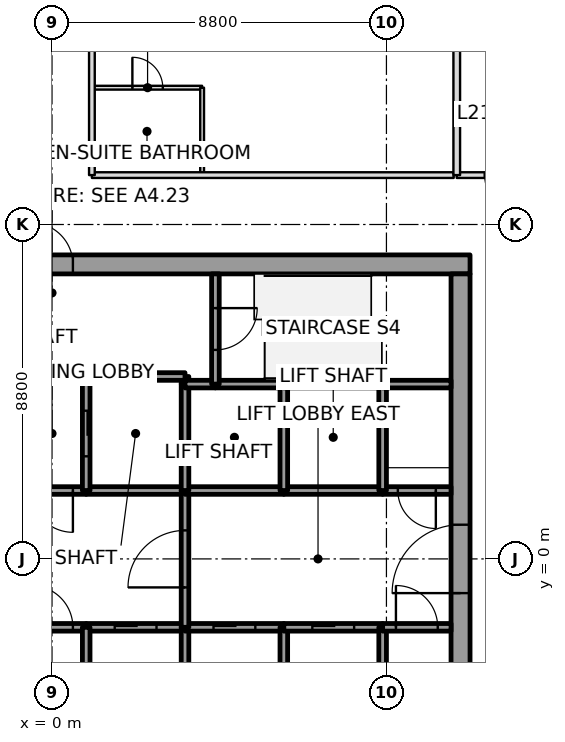
"""IFC4 building model, lengths in metres.
Left out: names, types, materials, properties, quantities, classifications, styles, units other than length and angle.
Written with IfcOpenShell. Run it as: python <this file> out.ifc"""

import sys

from ifc_helpers import new_model, si_unit, direction, frame, frame_2d, origin, place, context, subcontext, project, spatial, rectangle, extrude, element, fill, save


model = new_model("IFC4")
c1 = context("Model", 3, precision=1e-05, world=origin(), true_north=direction((0.0, 1.0)))
c2 = subcontext(c1, "Body", "Model", "MODEL_VIEW")
j1 = project(units=[si_unit("LENGTHUNIT", "METRE"), si_unit("PLANEANGLEUNIT", "RADIAN")], contexts=[c1])
p1 = place(None, origin())
s1 = spatial("IfcSite", under=j1, at=p1, CompositionType="ELEMENT")
p2 = place(p1, origin())
s2 = spatial("IfcBuilding", under=s1, at=p2, CompositionType="ELEMENT")
p3 = place(p2, frame((0.0, 0.0, 99.8)))
s3 = spatial("IfcBuildingStorey", under=s2, at=p3, CompositionType="ELEMENT", Elevation=99.8)
p4 = place(p3, frame((-11.0, 7.75, 0.0), z_axis=(0.0, 0.0, 1.0), x_axis=(1.0, 0.0, 0.0)))
e1 = element("IfcWall", 1, at=p4, inside=s3, PredefinedType="SHEAR", context=c2, shape_type="SweptSolid", body=[
    extrude(rectangle(XDim=22.0, YDim=0.5, at=frame_2d((11.0, 0.0))), origin(), (0.0, 0.0, 1.0), 3.7),
])
p5 = place(p4, frame((10.45, 0.0, 0.0)))
e2 = element("IfcOpeningElement", 2, at=p5, cuts=e1, PredefinedType="OPENING", context=c2, shape_type="SweptSolid", body=[
    extrude(rectangle(XDim=1.1, YDim=2.1, at=frame_2d((0.55, 1.05))), frame((0.0, 0.25, 0.0), z_axis=(0.0, -1.0, 0.0), x_axis=(1.0, 0.0, 0.0)), (0.0, 0.0, 1.0), 0.5),
])
p6 = place(p3, frame((10.75, -7.5, 0.0), z_axis=(0.0, 0.0, 1.0), x_axis=(0.0, 1.0, 0.0)))
e3 = element("IfcWall", 3, at=p6, inside=s3, PredefinedType="SHEAR", context=c2, shape_type="SweptSolid", body=[
    extrude(rectangle(XDim=15.0, YDim=0.5, at=frame_2d((7.5, 0.0))), origin(), (0.0, 0.0, 1.0), 3.7),
])
p7 = place(p6, frame((6.6, 0.0, 0.0)))
e4 = element("IfcOpeningElement", 4, at=p7, cuts=e3, PredefinedType="OPENING", context=c2, shape_type="SweptSolid", body=[
    extrude(rectangle(XDim=1.8, YDim=2.1, at=frame_2d((0.9, 1.05))), frame((0.0, 0.25, 0.0), z_axis=(0.0, -1.0, 0.0), x_axis=(1.0, 0.0, 0.0)), (0.0, 0.0, 1.0), 0.5),
])
p8 = place(p3, frame((-0.9, -1.8, 0.0), z_axis=(0.0, 0.0, 1.0), x_axis=(1.0, 0.0, 0.0)))
e5 = element("IfcWall", 5, at=p8, inside=s3, PredefinedType="SOLIDWALL", context=c2, shape_type="SweptSolid", body=[
    extrude(rectangle(XDim=1.8, YDim=0.2, at=frame_2d((0.9, 0.0))), origin(), (0.0, 0.0, 1.0), 3.55),
])
p9 = place(p8, frame((0.35, 0.0, 0.0)))
e6 = element("IfcOpeningElement", 6, at=p9, cuts=e5, PredefinedType="OPENING", context=c2, shape_type="SweptSolid", body=[
    extrude(rectangle(XDim=1.1, YDim=2.1, at=frame_2d((0.55, 1.05))), frame((0.0, 0.1, 0.0), z_axis=(0.0, -1.0, 0.0), x_axis=(1.0, 0.0, 0.0)), (0.0, 0.0, 1.0), 0.2),
])
p10 = place(p3, frame((0.9, 1.8, 0.0), z_axis=(0.0, 0.0, 1.0), x_axis=(-1.0, 0.0, 0.0)))
e7 = element("IfcWall", 7, at=p10, inside=s3, PredefinedType="SOLIDWALL", context=c2, shape_type="SweptSolid", body=[
    extrude(rectangle(XDim=1.8, YDim=0.2, at=frame_2d((0.9, 0.0))), origin(), (0.0, 0.0, 1.0), 3.55),
])
p11 = place(p10, frame((0.35, 0.0, 0.0)))
e8 = element("IfcOpeningElement", 8, at=p11, cuts=e7, PredefinedType="OPENING", context=c2, shape_type="SweptSolid", body=[
    extrude(rectangle(XDim=1.1, YDim=2.1, at=frame_2d((0.55, 1.05))), frame((0.0, 0.1, 0.0), z_axis=(0.0, -1.0, 0.0), x_axis=(1.0, 0.0, 0.0)), (0.0, 0.0, 1.0), 0.2),
])
p12 = place(p3, frame((0.9, -1.8, 0.0), z_axis=(0.0, 0.0, 1.0), x_axis=(1.0, 0.0, 0.0)))
e9 = element("IfcWall", 9, at=p12, inside=s3, PredefinedType="SOLIDWALL", context=c2, shape_type="SweptSolid", body=[
    extrude(rectangle(XDim=2.6, YDim=0.2, at=frame_2d((1.3, 0.0))), origin(), (0.0, 0.0, 1.0), 3.55),
])
p13 = place(p12, frame((0.75, 0.0, 0.0)))
e10 = element("IfcOpeningElement", 10, at=p13, cuts=e9, PredefinedType="OPENING", context=c2, shape_type="SweptSolid", body=[
    extrude(rectangle(XDim=1.1, YDim=2.1, at=frame_2d((0.55, 1.05))), frame((0.0, 0.1, 0.0), z_axis=(0.0, -1.0, 0.0), x_axis=(1.0, 0.0, 0.0)), (0.0, 0.0, 1.0), 0.2),
])
p14 = place(p3, frame((0.9, -1.8, 0.0), z_axis=(0.0, 0.0, 1.0), x_axis=(0.0, -1.0, 0.0)))
e11 = element("IfcWall", 11, at=p14, inside=s3, PredefinedType="SOLIDWALL", context=c2, shape_type="SweptSolid", body=[
    extrude(rectangle(XDim=2.8, YDim=0.2, at=frame_2d((1.4, 0.0))), origin(), (0.0, 0.0, 1.0), 3.55),
])
p15 = place(p3, frame((3.5, 1.8, 0.0), z_axis=(0.0, 0.0, 1.0), x_axis=(-1.0, 0.0, 0.0)))
e12 = element("IfcWall", 12, at=p15, inside=s3, PredefinedType="SOLIDWALL", context=c2, shape_type="SweptSolid", body=[
    extrude(rectangle(XDim=2.6, YDim=0.2, at=frame_2d((1.3, 0.0))), origin(), (0.0, 0.0, 1.0), 3.55),
])
p16 = place(p3, frame((3.5, 4.6, 0.0), z_axis=(0.0, 0.0, 1.0), x_axis=(0.0, 1.0, 0.0)))
e13 = element("IfcWall", 13, at=p16, inside=s3, PredefinedType="SOLIDWALL", context=c2, shape_type="SweptSolid", body=[
    extrude(rectangle(XDim=0.2, YDim=0.2, at=frame_2d((0.1, 0.0))), origin(), (0.0, 0.0, 1.0), 3.55),
])
p17 = place(p3, frame((3.5, 4.8, 0.0), z_axis=(0.0, 0.0, 1.0), x_axis=(-1.0, 0.0, 0.0)))
e14 = element("IfcWall", 14, at=p17, inside=s3, PredefinedType="SOLIDWALL", context=c2, shape_type="SweptSolid", body=[
    extrude(rectangle(XDim=2.6, YDim=0.2, at=frame_2d((1.3, 0.0))), origin(), (0.0, 0.0, 1.0), 3.55),
])
p18 = place(p3, frame((0.9, 4.8, 0.0), z_axis=(0.0, 0.0, 1.0), x_axis=(0.0, -1.0, 0.0)))
e15 = element("IfcWall", 15, at=p18, inside=s3, PredefinedType="SOLIDWALL", context=c2, shape_type="SweptSolid", body=[
    extrude(rectangle(XDim=3.0, YDim=0.2, at=frame_2d((1.5, 0.0))), origin(), (0.0, 0.0, 1.0), 3.55),
])
p19 = place(p18, frame((0.9, 0.0, 0.0)))
e16 = element("IfcOpeningElement", 16, at=p19, cuts=e15, PredefinedType="OPENING", context=c2, shape_type="SweptSolid", body=[
    extrude(rectangle(XDim=1.2, YDim=2.1, at=frame_2d((0.6, 1.05))), frame((0.0, 0.1, 0.0), z_axis=(0.0, -1.0, 0.0), x_axis=(1.0, 0.0, 0.0)), (0.0, 0.0, 1.0), 0.2),
])
p20 = place(p3, frame((3.5, -4.6, 0.0), z_axis=(0.0, 0.0, 1.0), x_axis=(0.0, 1.0, 0.0)))
e17 = element("IfcWall", 17, at=p20, inside=s3, PredefinedType="SOLIDWALL", context=c2, shape_type="SweptSolid", body=[
    extrude(rectangle(XDim=2.8, YDim=0.2, at=frame_2d((1.4, 0.0))), origin(), (0.0, 0.0, 1.0), 3.55),
])
p21 = place(p3, frame((3.5, -1.8, 0.0), z_axis=(0.0, 0.0, 1.0), x_axis=(1.0, 0.0, 0.0)))
e18 = element("IfcWall", 18, at=p21, inside=s3, PredefinedType="SOLIDWALL", context=c2, shape_type="SweptSolid", body=[
    extrude(rectangle(XDim=2.6, YDim=0.2, at=frame_2d((1.3, 0.0))), origin(), (0.0, 0.0, 1.0), 3.55),
])
p22 = place(p21, frame((0.75, 0.0, 0.0)))
e19 = element("IfcOpeningElement", 19, at=p22, cuts=e18, PredefinedType="OPENING", context=c2, shape_type="SweptSolid", body=[
    extrude(rectangle(XDim=1.1, YDim=2.1, at=frame_2d((0.55, 1.05))), frame((0.0, 0.1, 0.0), z_axis=(0.0, -1.0, 0.0), x_axis=(1.0, 0.0, 0.0)), (0.0, 0.0, 1.0), 0.2),
])
p23 = place(p3, frame((3.5, -1.8, 0.0), z_axis=(0.0, 0.0, 1.0), x_axis=(0.0, 1.0, 0.0)))
e20 = element("IfcWall", 20, at=p23, inside=s3, PredefinedType="SOLIDWALL", context=c2, shape_type="SweptSolid", body=[
    extrude(rectangle(XDim=3.6, YDim=0.2, at=frame_2d((1.8, 0.0))), origin(), (0.0, 0.0, 1.0), 3.55),
])
p24 = place(p23, frame((1.05, 0.0, 0.0)))
e21 = element("IfcOpeningElement", 21, at=p24, cuts=e20, PredefinedType="OPENING", context=c2, shape_type="SweptSolid", body=[
    extrude(rectangle(XDim=1.5, YDim=2.1, at=frame_2d((0.75, 1.05))), frame((0.0, 0.1, 0.0), z_axis=(0.0, -1.0, 0.0), x_axis=(1.0, 0.0, 0.0)), (0.0, 0.0, 1.0), 0.2),
])
p25 = place(p3, frame((6.1, 1.8, 0.0), z_axis=(0.0, 0.0, 1.0), x_axis=(-1.0, 0.0, 0.0)))
e22 = element("IfcWall", 22, at=p25, inside=s3, PredefinedType="SOLIDWALL", context=c2, shape_type="SweptSolid", body=[
    extrude(rectangle(XDim=2.6, YDim=0.2, at=frame_2d((1.3, 0.0))), origin(), (0.0, 0.0, 1.0), 3.55),
])
p26 = place(p3, frame((3.5, 1.8, 0.0), z_axis=(0.0, 0.0, 1.0), x_axis=(0.0, 1.0, 0.0)))
e23 = element("IfcWall", 23, at=p26, inside=s3, PredefinedType="SOLIDWALL", context=c2, shape_type="SweptSolid", body=[
    extrude(rectangle(XDim=2.8, YDim=0.2, at=frame_2d((1.4, 0.0))), origin(), (0.0, 0.0, 1.0), 3.55),
])
p27 = place(p3, frame((4.3, 4.6, 0.0), z_axis=(0.0, 0.0, 1.0), x_axis=(-1.0, 0.0, 0.0)))
e24 = element("IfcWall", 24, at=p27, inside=s3, PredefinedType="SOLIDWALL", context=c2, shape_type="SweptSolid", body=[
    extrude(rectangle(XDim=0.8, YDim=0.2, at=frame_2d((0.4, 0.0))), origin(), (0.0, 0.0, 1.0), 3.55),
])
p28 = place(p3, frame((6.1, 4.6, 0.0), z_axis=(0.0, 0.0, 1.0), x_axis=(-1.0, 0.0, 0.0)))
e25 = element("IfcWall", 25, at=p28, inside=s3, PredefinedType="SOLIDWALL", context=c2, shape_type="SweptSolid", body=[
    extrude(rectangle(XDim=1.8, YDim=0.2, at=frame_2d((0.9, 0.0))), origin(), (0.0, 0.0, 1.0), 3.55),
])
p29 = place(p3, frame((4.3, 7.5, 0.0), z_axis=(0.0, 0.0, 1.0), x_axis=(0.0, -1.0, 0.0)))
e26 = element("IfcWall", 26, at=p29, inside=s3, PredefinedType="SOLIDWALL", context=c2, shape_type="SweptSolid", body=[
    extrude(rectangle(XDim=2.9, YDim=0.2, at=frame_2d((1.45, 0.0))), origin(), (0.0, 0.0, 1.0), 3.55),
])
p30 = place(p29, frame((0.9, 0.0, 0.0)))
e27 = element("IfcOpeningElement", 27, at=p30, cuts=e26, PredefinedType="OPENING", context=c2, shape_type="SweptSolid", body=[
    extrude(rectangle(XDim=1.1, YDim=2.1, at=frame_2d((0.55, 1.05))), frame((0.0, 0.1, 0.0), z_axis=(0.0, -1.0, 0.0), x_axis=(1.0, 0.0, 0.0)), (0.0, 0.0, 1.0), 0.2),
])
p31 = place(p3, frame((6.1, -4.6, 0.0), z_axis=(0.0, 0.0, 1.0), x_axis=(0.0, 1.0, 0.0)))
e28 = element("IfcWall", 28, at=p31, inside=s3, PredefinedType="SOLIDWALL", context=c2, shape_type="SweptSolid", body=[
    extrude(rectangle(XDim=2.8, YDim=0.2, at=frame_2d((1.4, 0.0))), origin(), (0.0, 0.0, 1.0), 3.55),
])
p32 = place(p3, frame((6.1, -1.8, 0.0), z_axis=(0.0, 0.0, 1.0), x_axis=(1.0, 0.0, 0.0)))
e29 = element("IfcWall", 29, at=p32, inside=s3, PredefinedType="SOLIDWALL", context=c2, shape_type="SweptSolid", body=[
    extrude(rectangle(XDim=2.6, YDim=0.2, at=frame_2d((1.3, 0.0))), origin(), (0.0, 0.0, 1.0), 3.55),
])
p33 = place(p32, frame((0.75, 0.0, 0.0)))
e30 = element("IfcOpeningElement", 30, at=p33, cuts=e29, PredefinedType="OPENING", context=c2, shape_type="SweptSolid", body=[
    extrude(rectangle(XDim=1.1, YDim=2.1, at=frame_2d((0.55, 1.05))), frame((0.0, 0.1, 0.0), z_axis=(0.0, -1.0, 0.0), x_axis=(1.0, 0.0, 0.0)), (0.0, 0.0, 1.0), 0.2),
])
p34 = place(p3, frame((8.7, 1.8, 0.0), z_axis=(0.0, 0.0, 1.0), x_axis=(-1.0, 0.0, 0.0)))
e31 = element("IfcWall", 31, at=p34, inside=s3, PredefinedType="SOLIDWALL", context=c2, shape_type="SweptSolid", body=[
    extrude(rectangle(XDim=2.6, YDim=0.2, at=frame_2d((1.3, 0.0))), origin(), (0.0, 0.0, 1.0), 3.55),
])
p35 = place(p3, frame((6.1, 1.8, 0.0), z_axis=(0.0, 0.0, 1.0), x_axis=(0.0, 1.0, 0.0)))
e32 = element("IfcWall", 32, at=p35, inside=s3, PredefinedType="SOLIDWALL", context=c2, shape_type="SweptSolid", body=[
    extrude(rectangle(XDim=2.8, YDim=0.2, at=frame_2d((1.4, 0.0))), origin(), (0.0, 0.0, 1.0), 3.55),
])
p36 = place(p3, frame((8.7, 4.6, 0.0), z_axis=(0.0, 0.0, 1.0), x_axis=(-1.0, 0.0, 0.0)))
e33 = element("IfcWall", 33, at=p36, inside=s3, PredefinedType="SOLIDWALL", context=c2, shape_type="SweptSolid", body=[
    extrude(rectangle(XDim=2.6, YDim=0.2, at=frame_2d((1.3, 0.0))), origin(), (0.0, 0.0, 1.0), 3.55),
])
p37 = place(p3, frame((8.7, -1.8, 0.0), z_axis=(0.0, 0.0, 1.0), x_axis=(0.0, -1.0, 0.0)))
e34 = element("IfcWall", 34, at=p37, inside=s3, PredefinedType="SOLIDWALL", context=c2, shape_type="SweptSolid", body=[
    extrude(rectangle(XDim=2.8, YDim=0.2, at=frame_2d((1.4, 0.0))), origin(), (0.0, 0.0, 1.0), 3.55),
])
p38 = place(p3, frame((8.7, -1.8, 0.0), z_axis=(0.0, 0.0, 1.0), x_axis=(1.0, 0.0, 0.0)))
e35 = element("IfcWall", 35, at=p38, inside=s3, PredefinedType="SOLIDWALL", context=c2, shape_type="SweptSolid", body=[
    extrude(rectangle(XDim=1.8, YDim=0.2, at=frame_2d((0.9, 0.0))), origin(), (0.0, 0.0, 1.0), 3.55),
])
p39 = place(p38, frame((0.35, 0.0, 0.0)))
e36 = element("IfcOpeningElement", 36, at=p39, cuts=e35, PredefinedType="OPENING", context=c2, shape_type="SweptSolid", body=[
    extrude(rectangle(XDim=1.1, YDim=2.1, at=frame_2d((0.55, 1.05))), frame((0.0, 0.1, 0.0), z_axis=(0.0, -1.0, 0.0), x_axis=(1.0, 0.0, 0.0)), (0.0, 0.0, 1.0), 0.2),
])
p40 = place(p3, frame((10.5, 1.8, 0.0), z_axis=(0.0, 0.0, 1.0), x_axis=(-1.0, 0.0, 0.0)))
e37 = element("IfcWall", 37, at=p40, inside=s3, PredefinedType="SOLIDWALL", context=c2, shape_type="SweptSolid", body=[
    extrude(rectangle(XDim=1.8, YDim=0.2, at=frame_2d((0.9, 0.0))), origin(), (0.0, 0.0, 1.0), 3.55),
])
p41 = place(p40, frame((0.4, 0.0, 0.0)))
e38 = element("IfcOpeningElement", 38, at=p41, cuts=e37, PredefinedType="OPENING", context=c2, shape_type="SweptSolid", body=[
    extrude(rectangle(XDim=1.0, YDim=2.1, at=frame_2d((0.5, 1.05))), frame((0.0, 0.1, 0.0), z_axis=(0.0, -1.0, 0.0), x_axis=(1.0, 0.0, 0.0)), (0.0, 0.0, 1.0), 0.2),
])
p42 = place(p3, frame((8.7, 4.6, 0.0), z_axis=(0.0, 0.0, 1.0), x_axis=(0.0, -1.0, 0.0)))
e39 = element("IfcWall", 39, at=p42, inside=s3, PredefinedType="SOLIDWALL", context=c2, shape_type="SweptSolid", body=[
    extrude(rectangle(XDim=2.8, YDim=0.2, at=frame_2d((1.4, 0.0))), origin(), (0.0, 0.0, 1.0), 3.55),
])
p43 = place(p3, frame((10.5, 4.6, 0.0), z_axis=(0.0, 0.0, 1.0), x_axis=(-1.0, 0.0, 0.0)))
e40 = element("IfcWall", 40, at=p43, inside=s3, PredefinedType="SOLIDWALL", context=c2, shape_type="SweptSolid", body=[
    extrude(rectangle(XDim=1.8, YDim=0.2, at=frame_2d((0.9, 0.0))), origin(), (0.0, 0.0, 1.0), 3.55),
])
p44 = place(p3, frame((10.65, 24.958, 0.0), z_axis=(0.0, 0.0, 1.0), x_axis=(0.0, -1.0, 0.0)))
e41 = element("IfcWall", 41, at=p44, inside=s3, PredefinedType="PARTITIONING", context=c2, shape_type="SweptSolid", body=[
    extrude(rectangle(XDim=14.858, YDim=0.175, at=frame_2d((7.429, 0.0))), origin(), (0.0, 0.0, 1.0), 2.934),
])
p45 = place(p3, frame((10.57, 10.1, 0.0), z_axis=(0.0, 0.0, 1.0), x_axis=(-1.0, 0.0, 0.0)))
e42 = element("IfcWall", 42, at=p45, inside=s3, PredefinedType="PARTITIONING", context=c2, shape_type="SweptSolid", body=[
    extrude(rectangle(XDim=9.52, YDim=0.15, at=frame_2d((4.76, 0.0))), origin(), (0.0, 0.0, 1.0), 2.947),
])
p46 = place(p3, frame((1.05, 10.1, 0.0), z_axis=(0.0, 0.0, 1.0), x_axis=(0.0, 1.0, 0.0)))
e43 = element("IfcWall", 43, at=p46, inside=s3, PredefinedType="PARTITIONING", context=c2, shape_type="SweptSolid", body=[
    extrude(rectangle(XDim=15.749, YDim=0.15, at=frame_2d((7.875, 0.0))), origin(), (0.0, 0.0, 1.0), 2.947),
])
p47 = place(p46, frame((8.615, 0.0, 0.0)))
e44 = element("IfcOpeningElement", 44, at=p47, cuts=e43, PredefinedType="OPENING", context=c2, shape_type="SweptSolid", body=[
    extrude(rectangle(XDim=1.0, YDim=2.1, at=frame_2d((0.5, 1.05))), frame((0.0, 0.075, 0.0), z_axis=(0.0, -1.0, 0.0), x_axis=(1.0, 0.0, 0.0)), (0.0, 0.0, 1.0), 0.15),
])
p48 = place(p3, frame((13.02, 10.1, 0.0), z_axis=(0.0, 0.0, 1.0), x_axis=(-1.0, 0.0, 0.0)))
e45 = element("IfcWall", 45, at=p48, inside=s3, PredefinedType="PARTITIONING", context=c2, shape_type="SweptSolid", body=[
    extrude(rectangle(XDim=2.37, YDim=0.15, at=frame_2d((1.185, 0.0))), origin(), (0.0, 0.0, 1.0), 3.0),
])
p49 = place(p48, frame((0.635, 0.0, 0.0)))
e46 = element("IfcOpeningElement", 46, at=p49, cuts=e45, PredefinedType="OPENING", context=c2, shape_type="SweptSolid", body=[
    extrude(rectangle(XDim=1.0, YDim=2.1, at=frame_2d((0.5, 1.05))), frame((0.0, 0.075, 0.0), z_axis=(0.0, -1.0, 0.0), x_axis=(1.0, 0.0, 0.0)), (0.0, 0.0, 1.0), 0.15),
])
p50 = place(p3, frame((1.08, 12.4, 0.0), z_axis=(0.0, 0.0, 1.0), x_axis=(1.0, 0.0, 0.0)))
e47 = element("IfcWall", 47, at=p50, inside=s3, PredefinedType="PARTITIONING", context=c2, shape_type="SweptSolid", body=[
    extrude(rectangle(XDim=2.87, YDim=0.1, at=frame_2d((1.435, 0.0))), origin(), (0.0, 0.0, 1.0), 3.0),
])
p51 = place(p50, frame((1.035, 0.0, 0.0)))
e48 = element("IfcOpeningElement", 48, at=p51, cuts=e47, PredefinedType="OPENING", context=c2, shape_type="SweptSolid", body=[
    extrude(rectangle(XDim=0.8, YDim=2.1, at=frame_2d((0.4, 1.05))), frame((0.0, 0.05, 0.0), z_axis=(0.0, -1.0, 0.0), x_axis=(1.0, 0.0, 0.0)), (0.0, 0.0, 1.0), 0.1),
])
p52 = place(p3, frame((3.95, 12.4, 0.0), z_axis=(0.0, 0.0, 1.0), x_axis=(0.0, -1.0, 0.0)))
e49 = element("IfcWall", 49, at=p52, inside=s3, PredefinedType="PARTITIONING", context=c2, shape_type="SweptSolid", body=[
    extrude(rectangle(XDim=2.27, YDim=0.1, at=frame_2d((1.135, 0.0))), origin(), (0.0, 0.0, 1.0), 3.0),
])
p53 = place(p49, origin())
e50 = element("IfcDoor", 50, at=p53, inside=s3, OperationType="SINGLE_SWING_LEFT", PredefinedType="DOOR", context=c2, shape_type="SweptSolid", body=[
    extrude(rectangle(XDim=1.0, YDim=2.1, at=frame_2d((0.5, 1.05))), frame((0.0, 0.025, 0.0), z_axis=(0.0, -1.0, 0.0), x_axis=(1.0, 0.0, 0.0)), (0.0, 0.0, 1.0), 0.05),
])
fill(e46, e50)
p54 = place(p51, origin())
e51 = element("IfcDoor", 51, at=p54, inside=s3, OperationType="SINGLE_SWING_LEFT", PredefinedType="DOOR", context=c2, shape_type="SweptSolid", body=[
    extrude(rectangle(XDim=0.8, YDim=2.1, at=frame_2d((0.4, 1.05))), frame((0.0, 0.025, 0.0), z_axis=(0.0, -1.0, 0.0), x_axis=(1.0, 0.0, 0.0)), (0.0, 0.0, 1.0), 0.05),
])
fill(e48, e51)
p55 = place(p13, origin())
e52 = element("IfcDoor", 52, at=p55, inside=s3, OperationType="SLIDING_TO_RIGHT", PredefinedType="DOOR", context=c2, shape_type="SweptSolid", body=[
    extrude(rectangle(XDim=1.1, YDim=2.1, at=frame_2d((0.55, 1.05))), frame((0.0, 0.025, 0.0), z_axis=(0.0, -1.0, 0.0), x_axis=(1.0, 0.0, 0.0)), (0.0, 0.0, 1.0), 0.05),
])
fill(e10, e52)
p56 = place(p22, origin())
e53 = element("IfcDoor", 53, at=p56, inside=s3, OperationType="SLIDING_TO_LEFT", PredefinedType="DOOR", context=c2, shape_type="SweptSolid", body=[
    extrude(rectangle(XDim=1.1, YDim=2.1, at=frame_2d((0.55, 1.05))), frame((0.0, 0.025, 0.0), z_axis=(0.0, -1.0, 0.0), x_axis=(1.0, 0.0, 0.0)), (0.0, 0.0, 1.0), 0.05),
])
fill(e19, e53)
p57 = place(p33, origin())
e54 = element("IfcDoor", 54, at=p57, inside=s3, OperationType="SLIDING_TO_LEFT", PredefinedType="DOOR", context=c2, shape_type="SweptSolid", body=[
    extrude(rectangle(XDim=1.1, YDim=2.1, at=frame_2d((0.55, 1.05))), frame((0.0, 0.025, 0.0), z_axis=(0.0, -1.0, 0.0), x_axis=(1.0, 0.0, 0.0)), (0.0, 0.0, 1.0), 0.05),
])
fill(e30, e54)
p58 = place(p19, origin())
e55 = element("IfcDoor", 55, at=p58, inside=s3, OperationType="SLIDING_TO_RIGHT", PredefinedType="DOOR", context=c2, shape_type="SweptSolid", body=[
    extrude(rectangle(XDim=1.2, YDim=2.1, at=frame_2d((0.6, 1.05))), frame((0.0, 0.025, 0.0), z_axis=(0.0, -1.0, 0.0), x_axis=(1.0, 0.0, 0.0)), (0.0, 0.0, 1.0), 0.05),
])
fill(e16, e55)
p59 = place(p24, origin())
e56 = element("IfcDoor", 56, at=p59, inside=s3, OperationType="DOUBLE_DOOR_SINGLE_SWING", PredefinedType="DOOR", context=c2, shape_type="SweptSolid", body=[
    extrude(rectangle(XDim=1.5, YDim=2.1, at=frame_2d((0.75, 1.05))), frame((0.0, 0.025, 0.0), z_axis=(0.0, -1.0, 0.0), x_axis=(1.0, 0.0, 0.0)), (0.0, 0.0, 1.0), 0.05),
])
fill(e21, e56)
p60 = place(p39, origin())
e57 = element("IfcDoor", 57, at=p60, inside=s3, OperationType="SINGLE_SWING_LEFT", PredefinedType="DOOR", context=c2, shape_type="SweptSolid", body=[
    extrude(rectangle(XDim=1.1, YDim=2.1, at=frame_2d((0.55, 1.05))), frame((0.0, 0.025, 0.0), z_axis=(0.0, -1.0, 0.0), x_axis=(1.0, 0.0, 0.0)), (0.0, 0.0, 1.0), 0.05),
])
fill(e36, e57)
p61 = place(p11, origin())
e58 = element("IfcDoor", 58, at=p61, inside=s3, OperationType="SINGLE_SWING_RIGHT", PredefinedType="DOOR", context=c2, shape_type="SweptSolid", body=[
    extrude(rectangle(XDim=1.1, YDim=2.1, at=frame_2d((0.55, 1.05))), frame((0.0, 0.025, 0.0), z_axis=(0.0, -1.0, 0.0), x_axis=(1.0, 0.0, 0.0)), (0.0, 0.0, 1.0), 0.05),
])
fill(e8, e58)
p62 = place(p9, origin())
e59 = element("IfcDoor", 59, at=p62, inside=s3, OperationType="SINGLE_SWING_LEFT", PredefinedType="DOOR", context=c2, shape_type="SweptSolid", body=[
    extrude(rectangle(XDim=1.1, YDim=2.1, at=frame_2d((0.55, 1.05))), frame((0.0, 0.025, 0.0), z_axis=(0.0, -1.0, 0.0), x_axis=(1.0, 0.0, 0.0)), (0.0, 0.0, 1.0), 0.05),
])
fill(e6, e59)
p63 = place(p41, origin())
e60 = element("IfcDoor", 60, at=p63, inside=s3, OperationType="SINGLE_SWING_LEFT", PredefinedType="DOOR", context=c2, shape_type="SweptSolid", body=[
    extrude(rectangle(XDim=1.0, YDim=2.1, at=frame_2d((0.5, 1.05))), frame((0.0, 0.025, 0.0), z_axis=(0.0, -1.0, 0.0), x_axis=(1.0, 0.0, 0.0)), (0.0, 0.0, 1.0), 0.05),
])
fill(e38, e60)
p64 = place(p30, origin())
e61 = element("IfcDoor", 61, at=p64, inside=s3, OperationType="SINGLE_SWING_LEFT", PredefinedType="DOOR", context=c2, shape_type="SweptSolid", body=[
    extrude(rectangle(XDim=1.1, YDim=2.1, at=frame_2d((0.55, 1.05))), frame((0.0, 0.025, 0.0), z_axis=(0.0, -1.0, 0.0), x_axis=(1.0, 0.0, 0.0)), (0.0, 0.0, 1.0), 0.05),
])
fill(e27, e61)
p65 = place(p7, origin())
e62 = element("IfcDoor", 62, at=p65, inside=s3, OperationType="DOUBLE_DOOR_SINGLE_SWING", PredefinedType="DOOR", context=c2, shape_type="SweptSolid", body=[
    extrude(rectangle(XDim=1.8, YDim=2.1, at=frame_2d((0.9, 1.05))), frame((0.0, 0.025, 0.0), z_axis=(0.0, -1.0, 0.0), x_axis=(1.0, 0.0, 0.0)), (0.0, 0.0, 1.0), 0.05),
])
fill(e4, e62)
p66 = place(p5, origin())
e63 = element("IfcDoor", 63, at=p66, inside=s3, OperationType="SINGLE_SWING_LEFT", PredefinedType="DOOR", context=c2, shape_type="SweptSolid", body=[
    extrude(rectangle(XDim=1.1, YDim=2.1, at=frame_2d((0.55, 1.05))), frame((0.0, 0.025, 0.0), z_axis=(0.0, -1.0, 0.0), x_axis=(1.0, 0.0, 0.0)), (0.0, 0.0, 1.0), 0.05),
])
fill(e2, e63)
save(model, sys.argv[1])
